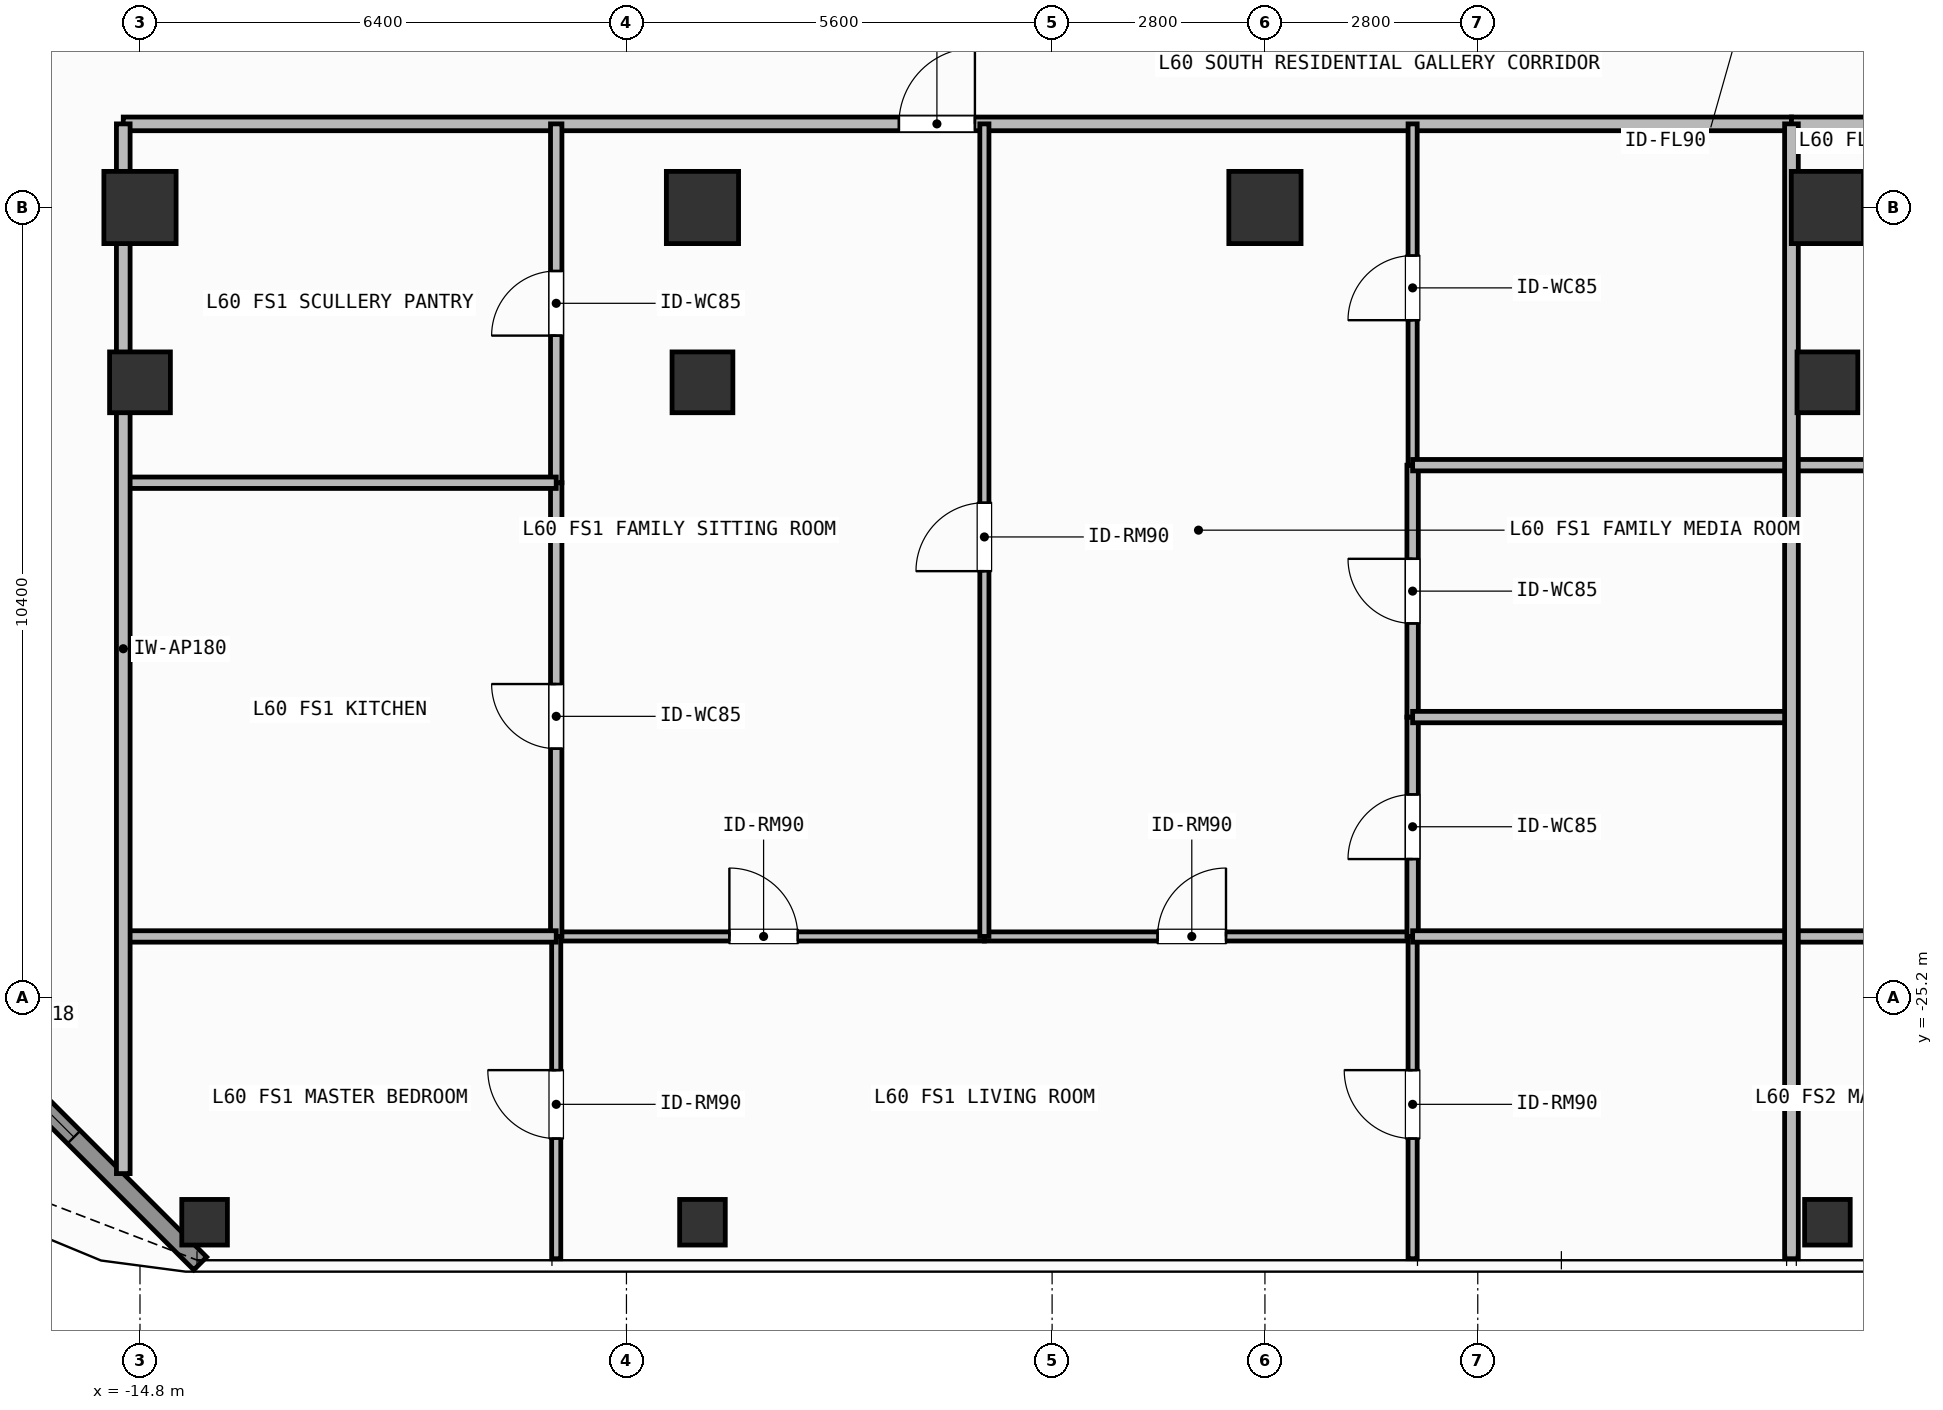
"""IFC4 building model, lengths in metres.
Left out: names, types, materials, properties, quantities, classifications, styles, units other than length and angle.
Written with IfcOpenShell. Run it as: python <this file> out.ifc"""

import sys

from ifc_helpers import new_model, si_unit, direction, frame, frame_2d, origin, origin_2d, place, context, subcontext, project, spatial, rectangle, hollow_rectangle, extrude, element, fill, save


model = new_model("IFC4")
c1 = context("Model", 3, precision=1e-05, world=origin(), true_north=direction((0.0, 1.0)))
c2 = subcontext(c1, "Body", "Model", "MODEL_VIEW")
j1 = project(units=[si_unit("LENGTHUNIT", "METRE"), si_unit("PLANEANGLEUNIT", "RADIAN")], contexts=[c1])
p1 = place(None, origin())
s1 = spatial("IfcSite", under=j1, at=p1, CompositionType="ELEMENT")
p2 = place(p1, origin())
s2 = spatial("IfcBuilding", under=s1, at=p2, CompositionType="ELEMENT")
p3 = place(p2, frame((0.0, 0.0, 246.9)))
s3 = spatial("IfcBuildingStorey", under=s2, at=p3, CompositionType="ELEMENT", Elevation=246.9)
for number, where, z_axis, x_axis in (
    (1, (-14.8, -14.8, 0.0), (0.0, 0.0, 1.0), (1.0, 0.0, 0.0)),
    (2, (-7.4, -14.8, 0.0), (0.0, 0.0, 1.0), (1.0, 0.0, 0.0)),
    (3, (0.0, -14.8, 0.0), (0.0, 0.0, 1.0), (1.0, 0.0, 0.0)),
    (4, (7.4, -14.8, 0.0), (0.0, 0.0, 1.0), (1.0, 0.0, 0.0)),
):
    element("IfcColumn", number, at=place(p3, frame(where, z_axis=z_axis, x_axis=x_axis)), inside=s3, PredefinedType="COLUMN", context=c2, shape_type="SweptSolid", body=[
        extrude(rectangle(XDim=0.95, YDim=0.95, at=origin_2d()), origin(), (0.0, 0.0, 1.0), 3.9),
    ])
for number, where, z_axis, x_axis in (
    (5, (-14.8, -17.1, 0.0), (0.0, 0.0, 1.0), (1.0, 0.0, 0.0)),
    (6, (-7.4, -17.1, 0.0), (0.0, 0.0, 1.0), (1.0, 0.0, 0.0)),
    (7, (7.4, -17.1, 0.0), (0.0, 0.0, 1.0), (1.0, 0.0, 0.0)),
):
    element("IfcColumn", number, at=place(p3, frame(where, z_axis=z_axis, x_axis=x_axis)), inside=s3, PredefinedType="COLUMN", context=c2, shape_type="SweptSolid", body=[
        extrude(hollow_rectangle(XDim=0.8, YDim=0.8, WallThickness=0.036, at=origin_2d()), origin(), (0.0, 0.0, 1.0), 3.9),
    ])
for number, where, z_axis, x_axis in (
    (8, (-13.95, -28.15, 0.0), (0.0, 0.0, 1.0), (1.0, 0.0, 0.0)),
    (9, (-7.4, -28.15, 0.0), (0.0, 0.0, 1.0), (1.0, 0.0, 0.0)),
    (10, (7.4, -28.15, 0.0), (0.0, 0.0, 1.0), (1.0, 0.0, 0.0)),
):
    element("IfcColumn", number, at=place(p3, frame(where, z_axis=z_axis, x_axis=x_axis)), inside=s3, PredefinedType="COLUMN", context=c2, shape_type="SweptSolid", body=[
        extrude(hollow_rectangle(XDim=0.6, YDim=0.6, WallThickness=0.028, at=origin_2d()), origin(), (0.0, 0.0, 1.0), 3.9),
    ])
p4 = place(p3, frame((-14.008, -28.692, 0.0), z_axis=(0.0, 0.0, 1.0), x_axis=(-0.707106781187, 0.707106781187, 0.0)))
e11 = element("IfcWall", 11, at=p4, inside=s3, PredefinedType="SOLIDWALL", context=c2, shape_type="SweptSolid", body=[
    extrude(rectangle(XDim=6.201, YDim=0.24, at=frame_2d((3.101, 0.0))), origin(), (0.0, 0.0, 1.0), 3.68),
])
p5 = place(p4, frame((2.351, 0.0, 0.8)))
e12 = element("IfcOpeningElement", 12, at=p5, cuts=e11, PredefinedType="OPENING", context=c2, shape_type="SweptSolid", body=[
    extrude(rectangle(XDim=1.5, YDim=1.85, at=frame_2d((0.75, 0.925))), frame((0.0, 0.13, 0.0), z_axis=(0.0, -1.0, 0.0), x_axis=(1.0, 0.0, 0.0)), (0.0, 0.0, 1.0), 0.26),
])
p6 = place(p3, frame((-15.02, -13.7, 0.0), z_axis=(0.0, 0.0, 1.0), x_axis=(1.0, 0.0, 0.0)))
e13 = element("IfcWall", 13, at=p6, inside=s3, PredefinedType="PARTITIONING", context=c2, shape_type="SweptSolid", body=[
    extrude(rectangle(XDim=21.947, YDim=0.18, at=frame_2d((10.974, 0.0))), origin(), (0.0, 0.0, 1.0), 3.68),
])
p7 = place(p6, frame((10.205, 0.0, 0.0)))
e14 = element("IfcOpeningElement", 14, at=p7, cuts=e13, PredefinedType="OPENING", context=c2, shape_type="SweptSolid", body=[
    extrude(rectangle(XDim=1.0, YDim=2.2, at=frame_2d((0.5, 1.1))), frame((0.0, 0.1, 0.0), z_axis=(0.0, -1.0, 0.0), x_axis=(1.0, 0.0, 0.0)), (0.0, 0.0, 1.0), 0.2),
])
p8 = place(p3, frame((-9.324, -24.39, 0.0), z_axis=(0.0, 0.0, 1.0), x_axis=(1.0, 0.0, 0.0)))
e15 = element("IfcWall", 15, at=p8, inside=s3, PredefinedType="PARTITIONING", context=c2, shape_type="SweptSolid", body=[
    extrude(rectangle(XDim=5.633, YDim=0.12, at=frame_2d((2.816, 0.0))), origin(), (0.0, 0.0, 1.0), 3.68),
])
p9 = place(p8, frame((2.278, 0.0, 0.0)))
e16 = element("IfcOpeningElement", 16, at=p9, cuts=e15, PredefinedType="OPENING", context=c2, shape_type="SweptSolid", body=[
    extrude(rectangle(XDim=0.9, YDim=2.1, at=frame_2d((0.45, 1.05))), frame((0.0, 0.07, 0.0), z_axis=(0.0, -1.0, 0.0), x_axis=(1.0, 0.0, 0.0)), (0.0, 0.0, 1.0), 0.14),
])
p10 = place(p3, frame((-3.691, -24.39, 0.0), z_axis=(0.0, 0.0, 1.0), x_axis=(1.0, 0.0, 0.0)))
e17 = element("IfcWall", 17, at=p10, inside=s3, PredefinedType="PARTITIONING", context=c2, shape_type="SweptSolid", body=[
    extrude(rectangle(XDim=5.634, YDim=0.12, at=frame_2d((2.817, 0.0))), origin(), (0.0, 0.0, 1.0), 3.68),
])
p11 = place(p10, frame((2.279, 0.0, 0.0)))
e18 = element("IfcOpeningElement", 18, at=p11, cuts=e17, PredefinedType="OPENING", context=c2, shape_type="SweptSolid", body=[
    extrude(rectangle(XDim=0.9, YDim=2.1, at=frame_2d((0.45, 1.05))), frame((0.0, 0.07, 0.0), z_axis=(0.0, -1.0, 0.0), x_axis=(1.0, 0.0, 0.0)), (0.0, 0.0, 1.0), 0.14),
])
p12 = place(p3, frame((-3.691, -24.39, 0.0), z_axis=(0.0, 0.0, 1.0), x_axis=(0.0, 1.0, 0.0)))
e19 = element("IfcWall", 19, at=p12, inside=s3, PredefinedType="PARTITIONING", context=c2, shape_type="SweptSolid", body=[
    extrude(rectangle(XDim=10.69, YDim=0.12, at=frame_2d((5.345, 0.0))), origin(), (0.0, 0.0, 1.0), 3.68),
])
p13 = place(p12, frame((4.806, 0.0, 0.0)))
e20 = element("IfcOpeningElement", 20, at=p13, cuts=e19, PredefinedType="OPENING", context=c2, shape_type="SweptSolid", body=[
    extrude(rectangle(XDim=0.9, YDim=2.1, at=frame_2d((0.45, 1.05))), frame((0.0, 0.07, 0.0), z_axis=(0.0, -1.0, 0.0), x_axis=(1.0, 0.0, 0.0)), (0.0, 0.0, 1.0), 0.14),
])
p14 = place(p3, frame((-9.324, -24.39, 0.0), z_axis=(0.0, 0.0, 1.0), x_axis=(0.0, 1.0, 0.0)))
e21 = element("IfcWall", 21, at=p14, inside=s3, PredefinedType="PARTITIONING", context=c2, shape_type="SweptSolid", body=[
    extrude(rectangle(XDim=5.969, YDim=0.15, at=frame_2d((2.984, 0.0))), origin(), (0.0, 0.0, 1.0), 3.68),
])
p15 = place(p14, frame((2.471, 0.0, 0.0)))
e22 = element("IfcOpeningElement", 22, at=p15, cuts=e21, PredefinedType="OPENING", context=c2, shape_type="SweptSolid", body=[
    extrude(rectangle(XDim=0.85, YDim=2.1, at=frame_2d((0.425, 1.05))), frame((0.0, 0.085, 0.0), z_axis=(0.0, -1.0, 0.0), x_axis=(1.0, 0.0, 0.0)), (0.0, 0.0, 1.0), 0.17),
])
p16 = place(p3, frame((-9.324, -18.421, 0.0), z_axis=(0.0, 0.0, 1.0), x_axis=(0.0, 1.0, 0.0)))
e23 = element("IfcWall", 23, at=p16, inside=s3, PredefinedType="PARTITIONING", context=c2, shape_type="SweptSolid", body=[
    extrude(rectangle(XDim=4.721, YDim=0.15, at=frame_2d((2.36, 0.0))), origin(), (0.0, 0.0, 1.0), 3.68),
])
p17 = place(p16, frame((1.936, 0.0, 0.0)))
e24 = element("IfcOpeningElement", 24, at=p17, cuts=e23, PredefinedType="OPENING", context=c2, shape_type="SweptSolid", body=[
    extrude(rectangle(XDim=0.85, YDim=2.1, at=frame_2d((0.425, 1.05))), frame((0.0, 0.085, 0.0), z_axis=(0.0, -1.0, 0.0), x_axis=(1.0, 0.0, 0.0)), (0.0, 0.0, 1.0), 0.17),
])
p18 = place(p3, frame((-9.324, -28.63, 0.0), z_axis=(0.0, 0.0, 1.0), x_axis=(0.0, 1.0, 0.0)))
e25 = element("IfcWall", 25, at=p18, inside=s3, PredefinedType="PARTITIONING", context=c2, shape_type="SweptSolid", body=[
    extrude(rectangle(XDim=4.24, YDim=0.12, at=frame_2d((2.12, 0.0))), origin(), (0.0, 0.0, 1.0), 3.68),
])
p19 = place(p18, frame((1.581, 0.0, 0.0)))
e26 = element("IfcOpeningElement", 26, at=p19, cuts=e25, PredefinedType="OPENING", context=c2, shape_type="SweptSolid", body=[
    extrude(rectangle(XDim=0.9, YDim=2.1, at=frame_2d((0.45, 1.05))), frame((0.0, 0.07, 0.0), z_axis=(0.0, -1.0, 0.0), x_axis=(1.0, 0.0, 0.0)), (0.0, 0.0, 1.0), 0.14),
])
p20 = place(p3, frame((1.943, -24.39, 0.0), z_axis=(0.0, 0.0, 1.0), x_axis=(0.0, 1.0, 0.0)))
e27 = element("IfcWall", 27, at=p20, inside=s3, PredefinedType="PARTITIONING", context=c2, shape_type="SweptSolid", body=[
    extrude(rectangle(XDim=2.886, YDim=0.15, at=frame_2d((1.443, 0.0))), origin(), (0.0, 0.0, 1.0), 3.68),
])
p21 = place(p20, frame((1.018, 0.0, 0.0)))
e28 = element("IfcOpeningElement", 28, at=p21, cuts=e27, PredefinedType="OPENING", context=c2, shape_type="SweptSolid", body=[
    extrude(rectangle(XDim=0.85, YDim=2.1, at=frame_2d((0.425, 1.05))), frame((0.0, 0.085, 0.0), z_axis=(0.0, -1.0, 0.0), x_axis=(1.0, 0.0, 0.0)), (0.0, 0.0, 1.0), 0.17),
])
p22 = place(p3, frame((1.943, -21.504, 0.0), z_axis=(0.0, 0.0, 1.0), x_axis=(0.0, 1.0, 0.0)))
e29 = element("IfcWall", 29, at=p22, inside=s3, PredefinedType="PARTITIONING", context=c2, shape_type="SweptSolid", body=[
    extrude(rectangle(XDim=3.314, YDim=0.15, at=frame_2d((1.657, 0.0))), origin(), (0.0, 0.0, 1.0), 3.68),
])
p23 = place(p22, frame((1.232, 0.0, 0.0)))
e30 = element("IfcOpeningElement", 30, at=p23, cuts=e29, PredefinedType="OPENING", context=c2, shape_type="SweptSolid", body=[
    extrude(rectangle(XDim=0.85, YDim=2.1, at=frame_2d((0.425, 1.05))), frame((0.0, 0.085, 0.0), z_axis=(0.0, -1.0, 0.0), x_axis=(1.0, 0.0, 0.0)), (0.0, 0.0, 1.0), 0.17),
])
p24 = place(p3, frame((1.943, -18.19, 0.0), z_axis=(0.0, 0.0, 1.0), x_axis=(0.0, 1.0, 0.0)))
e31 = element("IfcWall", 31, at=p24, inside=s3, PredefinedType="PARTITIONING", context=c2, shape_type="SweptSolid", body=[
    extrude(rectangle(XDim=4.49, YDim=0.12, at=frame_2d((2.245, 0.0))), origin(), (0.0, 0.0, 1.0), 3.68),
])
p25 = place(p24, frame((1.907, 0.0, 0.0)))
e32 = element("IfcOpeningElement", 32, at=p25, cuts=e31, PredefinedType="OPENING", context=c2, shape_type="SweptSolid", body=[
    extrude(rectangle(XDim=0.85, YDim=2.1, at=frame_2d((0.425, 1.05))), frame((0.0, 0.07, 0.0), z_axis=(0.0, -1.0, 0.0), x_axis=(1.0, 0.0, 0.0)), (0.0, 0.0, 1.0), 0.14),
])
p26 = place(p3, frame((1.943, -28.63, 0.0), z_axis=(0.0, 0.0, 1.0), x_axis=(0.0, 1.0, 0.0)))
e33 = element("IfcWall", 33, at=p26, inside=s3, PredefinedType="PARTITIONING", context=c2, shape_type="SweptSolid", body=[
    extrude(rectangle(XDim=4.24, YDim=0.12, at=frame_2d((2.12, 0.0))), origin(), (0.0, 0.0, 1.0), 3.68),
])
p27 = place(p26, frame((1.581, 0.0, 0.0)))
e34 = element("IfcOpeningElement", 34, at=p27, cuts=e33, PredefinedType="OPENING", context=c2, shape_type="SweptSolid", body=[
    extrude(rectangle(XDim=0.9, YDim=2.1, at=frame_2d((0.45, 1.05))), frame((0.0, 0.07, 0.0), z_axis=(0.0, -1.0, 0.0), x_axis=(1.0, 0.0, 0.0)), (0.0, 0.0, 1.0), 0.14),
])
p28 = place(p3, frame((6.927, -13.7, 0.0), z_axis=(0.0, 0.0, 1.0), x_axis=(1.0, 0.0, 0.0)))
e35 = element("IfcWall", 35, at=p28, inside=s3, PredefinedType="PARTITIONING", context=c2, shape_type="SweptSolid", body=[
    extrude(rectangle(XDim=15.893, YDim=0.18, at=frame_2d((7.947, 0.0))), origin(), (0.0, 0.0, 1.0), 3.68),
])
p29 = place(p28, frame((6.277, 0.0, 0.0)))
e36 = element("IfcOpeningElement", 36, at=p29, cuts=e35, PredefinedType="OPENING", context=c2, shape_type="SweptSolid", body=[
    extrude(rectangle(XDim=1.0, YDim=2.2, at=frame_2d((0.5, 1.1))), frame((0.0, 0.1, 0.0), z_axis=(0.0, -1.0, 0.0), x_axis=(1.0, 0.0, 0.0)), (0.0, 0.0, 1.0), 0.2),
])
for number, where, z_axis, x_axis in (
    (37, (-15.02, -18.421, 0.0), (0.0, 0.0, 1.0), (1.0, 0.0, 0.0)),
    (38, (-15.02, -24.39, 0.0), (0.0, 0.0, 1.0), (1.0, 0.0, 0.0)),
):
    element("IfcWall", number, at=place(p3, frame(where, z_axis=z_axis, x_axis=x_axis)), inside=s3, PredefinedType="PARTITIONING", context=c2, shape_type="SweptSolid", body=[
        extrude(rectangle(XDim=5.696, YDim=0.15, at=frame_2d((2.848, 0.0))), origin(), (0.0, 0.0, 1.0), 3.68),
    ])
for number, where, z_axis, x_axis in (
    (39, (1.943, -21.504, 0.0), (0.0, 0.0, 1.0), (1.0, 0.0, 0.0)),
    (40, (1.943, -18.19, 0.0), (0.0, 0.0, 1.0), (1.0, 0.0, 0.0)),
    (41, (1.943, -24.39, 0.0), (0.0, 0.0, 1.0), (1.0, 0.0, 0.0)),
):
    element("IfcWall", number, at=place(p3, frame(where, z_axis=z_axis, x_axis=x_axis)), inside=s3, PredefinedType="PARTITIONING", context=c2, shape_type="SweptSolid", body=[
        extrude(rectangle(XDim=4.984, YDim=0.15, at=frame_2d((2.492, 0.0))), origin(), (0.0, 0.0, 1.0), 3.68),
    ])
for number, where, z_axis, x_axis in (
    (42, (6.927, -18.19, 0.0), (0.0, 0.0, 1.0), (1.0, 0.0, 0.0)),
    (43, (6.927, -24.39, 0.0), (0.0, 0.0, 1.0), (1.0, 0.0, 0.0)),
):
    element("IfcWall", number, at=place(p3, frame(where, z_axis=z_axis, x_axis=x_axis)), inside=s3, PredefinedType="PARTITIONING", context=c2, shape_type="SweptSolid", body=[
        extrude(rectangle(XDim=4.803, YDim=0.15, at=frame_2d((2.401, 0.0))), origin(), (0.0, 0.0, 1.0), 3.68),
    ])
p30 = place(p3, frame((6.927, -28.63, 0.0), z_axis=(0.0, 0.0, 1.0), x_axis=(0.0, 1.0, 0.0)))
e44 = element("IfcWall", 44, at=p30, inside=s3, PredefinedType="PARTITIONING", context=c2, shape_type="SweptSolid", body=[
    extrude(rectangle(XDim=14.93, YDim=0.18, at=frame_2d((7.465, 0.0))), origin(), (0.0, 0.0, 1.0), 3.68),
])
p31 = place(p3, frame((-15.02, -27.51, 0.0), z_axis=(0.0, 0.0, 1.0), x_axis=(0.0, 1.0, 0.0)))
e45 = element("IfcWall", 45, at=p31, inside=s3, PredefinedType="PARTITIONING", context=c2, shape_type="SweptSolid", body=[
    extrude(rectangle(XDim=13.81, YDim=0.18, at=frame_2d((6.905, 0.0))), origin(), (0.0, 0.0, 1.0), 3.68),
])
p32 = place(p5, origin())
e46 = element("IfcWindow", 46, at=p32, inside=s3, PartitioningType="SINGLE_PANEL", PredefinedType="WINDOW", context=c2, shape_type="SweptSolid", body=[
    extrude(rectangle(XDim=1.5, YDim=1.85, at=frame_2d((0.75, 0.925))), frame((0.0, 0.03, 0.0), z_axis=(0.0, -1.0, 0.0), x_axis=(1.0, 0.0, 0.0)), (0.0, 0.0, 1.0), 0.06),
])
fill(e12, e46)
p33 = place(p7, origin())
e47 = element("IfcDoor", 47, at=p33, inside=s3, OperationType="SINGLE_SWING_RIGHT", PredefinedType="DOOR", context=c2, shape_type="SweptSolid", body=[
    extrude(rectangle(XDim=1.0, YDim=2.2, at=frame_2d((0.5, 1.1))), frame((0.0, 0.025, 0.0), z_axis=(0.0, -1.0, 0.0), x_axis=(1.0, 0.0, 0.0)), (0.0, 0.0, 1.0), 0.05),
])
fill(e14, e47)
p34 = place(p9, origin())
e48 = element("IfcDoor", 48, at=p34, inside=s3, OperationType="SINGLE_SWING_LEFT", PredefinedType="DOOR", context=c2, shape_type="SweptSolid", body=[
    extrude(rectangle(XDim=0.9, YDim=2.1, at=frame_2d((0.45, 1.05))), frame((0.0, 0.025, 0.0), z_axis=(0.0, -1.0, 0.0), x_axis=(1.0, 0.0, 0.0)), (0.0, 0.0, 1.0), 0.05),
])
fill(e16, e48)
p35 = place(p11, origin())
e49 = element("IfcDoor", 49, at=p35, inside=s3, OperationType="SINGLE_SWING_RIGHT", PredefinedType="DOOR", context=c2, shape_type="SweptSolid", body=[
    extrude(rectangle(XDim=0.9, YDim=2.1, at=frame_2d((0.45, 1.05))), frame((0.0, 0.025, 0.0), z_axis=(0.0, -1.0, 0.0), x_axis=(1.0, 0.0, 0.0)), (0.0, 0.0, 1.0), 0.05),
])
fill(e18, e49)
p36 = place(p13, origin())
e50 = element("IfcDoor", 50, at=p36, inside=s3, OperationType="SINGLE_SWING_LEFT", PredefinedType="DOOR", context=c2, shape_type="SweptSolid", body=[
    extrude(rectangle(XDim=0.9, YDim=2.1, at=frame_2d((0.45, 1.05))), frame((0.0, 0.025, 0.0), z_axis=(0.0, -1.0, 0.0), x_axis=(1.0, 0.0, 0.0)), (0.0, 0.0, 1.0), 0.05),
])
fill(e20, e50)
p37 = place(p15, origin())
e51 = element("IfcDoor", 51, at=p37, inside=s3, OperationType="SINGLE_SWING_RIGHT", PredefinedType="DOOR", context=c2, shape_type="SweptSolid", body=[
    extrude(rectangle(XDim=0.85, YDim=2.1, at=frame_2d((0.425, 1.05))), frame((0.0, 0.025, 0.0), z_axis=(0.0, -1.0, 0.0), x_axis=(1.0, 0.0, 0.0)), (0.0, 0.0, 1.0), 0.05),
])
fill(e22, e51)
p38 = place(p17, origin())
e52 = element("IfcDoor", 52, at=p38, inside=s3, OperationType="SINGLE_SWING_LEFT", PredefinedType="DOOR", context=c2, shape_type="SweptSolid", body=[
    extrude(rectangle(XDim=0.85, YDim=2.1, at=frame_2d((0.425, 1.05))), frame((0.0, 0.025, 0.0), z_axis=(0.0, -1.0, 0.0), x_axis=(1.0, 0.0, 0.0)), (0.0, 0.0, 1.0), 0.05),
])
fill(e24, e52)
p39 = place(p19, origin())
e53 = element("IfcDoor", 53, at=p39, inside=s3, OperationType="SINGLE_SWING_RIGHT", PredefinedType="DOOR", context=c2, shape_type="SweptSolid", body=[
    extrude(rectangle(XDim=0.9, YDim=2.1, at=frame_2d((0.45, 1.05))), frame((0.0, 0.025, 0.0), z_axis=(0.0, -1.0, 0.0), x_axis=(1.0, 0.0, 0.0)), (0.0, 0.0, 1.0), 0.05),
])
fill(e26, e53)
p40 = place(p21, origin())
e54 = element("IfcDoor", 54, at=p40, inside=s3, OperationType="SINGLE_SWING_LEFT", PredefinedType="DOOR", context=c2, shape_type="SweptSolid", body=[
    extrude(rectangle(XDim=0.85, YDim=2.1, at=frame_2d((0.425, 1.05))), frame((0.0, 0.025, 0.0), z_axis=(0.0, -1.0, 0.0), x_axis=(1.0, 0.0, 0.0)), (0.0, 0.0, 1.0), 0.05),
])
fill(e28, e54)
p41 = place(p23, origin())
e55 = element("IfcDoor", 55, at=p41, inside=s3, OperationType="SINGLE_SWING_RIGHT", PredefinedType="DOOR", context=c2, shape_type="SweptSolid", body=[
    extrude(rectangle(XDim=0.85, YDim=2.1, at=frame_2d((0.425, 1.05))), frame((0.0, 0.025, 0.0), z_axis=(0.0, -1.0, 0.0), x_axis=(1.0, 0.0, 0.0)), (0.0, 0.0, 1.0), 0.05),
])
fill(e30, e55)
p42 = place(p25, origin())
e56 = element("IfcDoor", 56, at=p42, inside=s3, OperationType="SINGLE_SWING_LEFT", PredefinedType="DOOR", context=c2, shape_type="SweptSolid", body=[
    extrude(rectangle(XDim=0.85, YDim=2.1, at=frame_2d((0.425, 1.05))), frame((0.0, 0.025, 0.0), z_axis=(0.0, -1.0, 0.0), x_axis=(1.0, 0.0, 0.0)), (0.0, 0.0, 1.0), 0.05),
])
fill(e32, e56)
p43 = place(p27, origin())
e57 = element("IfcDoor", 57, at=p43, inside=s3, OperationType="SINGLE_SWING_RIGHT", PredefinedType="DOOR", context=c2, shape_type="SweptSolid", body=[
    extrude(rectangle(XDim=0.9, YDim=2.1, at=frame_2d((0.45, 1.05))), frame((0.0, 0.025, 0.0), z_axis=(0.0, -1.0, 0.0), x_axis=(1.0, 0.0, 0.0)), (0.0, 0.0, 1.0), 0.05),
])
fill(e34, e57)
save(model, sys.argv[1])
